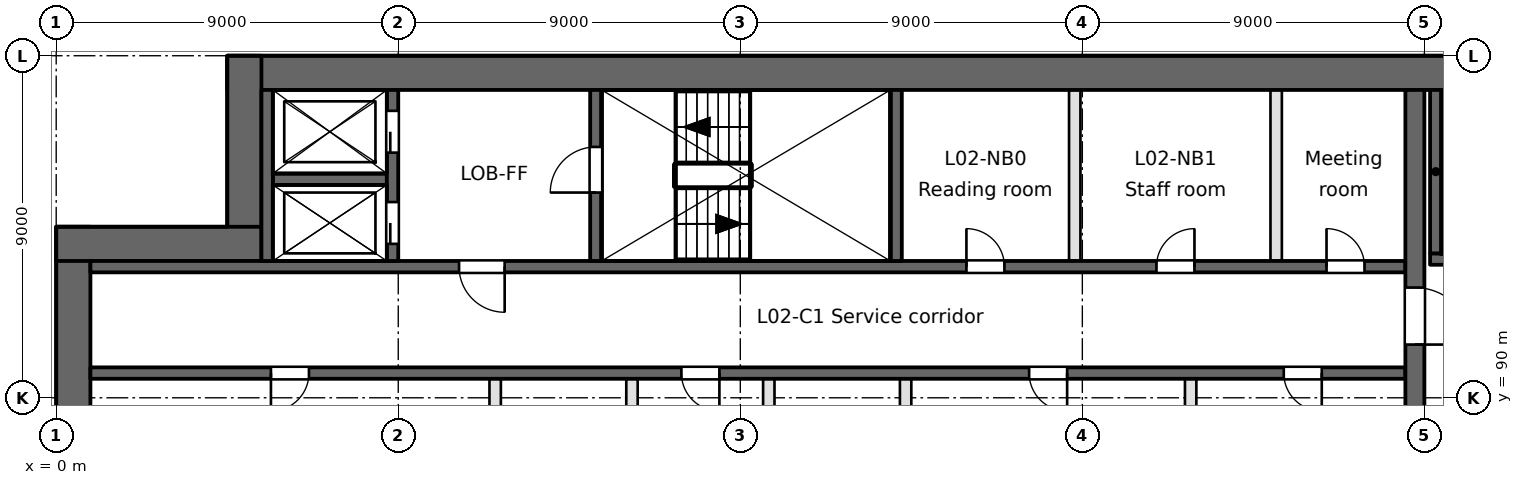
"""IFC4 building model, lengths in metres.
Left out: names, types, materials, properties, quantities, classifications, styles, units other than length and angle.
Written with IfcOpenShell. Run it as: python <this file> out.ifc"""

import sys

from ifc_helpers import new_model, si_unit, direction, frame, frame_2d, origin, place, context, subcontext, project, spatial, rectangle, extrude, element, fill, save


model = new_model("IFC4")
c1 = context("Model", 3, precision=1e-05, world=origin(), true_north=direction((0.0, 1.0)))
c2 = subcontext(c1, "Body", "Model", "MODEL_VIEW")
j1 = project(units=[si_unit("LENGTHUNIT", "METRE"), si_unit("PLANEANGLEUNIT", "RADIAN")], contexts=[c1])
p1 = place(None, origin())
s1 = spatial("IfcSite", under=j1, at=p1, CompositionType="ELEMENT")
p2 = place(p1, origin())
s2 = spatial("IfcBuilding", under=s1, at=p2, CompositionType="ELEMENT")
p3 = place(p2, frame((0.0, 0.0, 11.4)))
s3 = spatial("IfcBuildingStorey", under=s2, at=p3, CompositionType="ELEMENT", Elevation=11.4)
p4 = place(p3, frame((0.45, 94.5, 0.0), z_axis=(0.0, 0.0, 1.0), x_axis=(0.0, -1.0, 0.0)))
e1 = element("IfcWall", 1, at=p4, inside=s3, PredefinedType="SHEAR", context=c2, shape_type="SweptSolid", body=[
    extrude(rectangle(XDim=66.085, YDim=0.9, at=frame_2d((33.042, 0.0))), origin(), (0.0, 0.0, 1.0), 5.4),
])
p5 = place(p3, frame((94.5, 98.55, 0.0), z_axis=(0.0, 0.0, 1.0), x_axis=(-1.0, 0.0, 0.0)))
e2 = element("IfcWall", 2, at=p5, inside=s3, PredefinedType="SHEAR", context=c2, shape_type="SweptSolid", body=[
    extrude(rectangle(XDim=90.0, YDim=0.9, at=frame_2d((45.0, 0.0))), origin(), (0.0, 0.0, 1.0), 5.4),
])
for number, where, z_axis, x_axis in (
    (3, (4.95, 99.0, 0.0), (0.0, 0.0, 1.0), (0.0, -1.0, 0.0)),
    (4, (5.4, 94.05, 0.0), (0.0, 0.0, 1.0), (-1.0, 0.0, 0.0)),
):
    element("IfcWall", number, at=place(p3, frame(where, z_axis=z_axis, x_axis=x_axis)), inside=s3, PredefinedType="SHEAR", context=c2, shape_type="SweptSolid", body=[
        extrude(rectangle(XDim=5.4, YDim=0.9, at=frame_2d((2.7, 0.0))), origin(), (0.0, 0.0, 1.0), 5.4),
    ])
p6 = place(p3, frame((0.9, 90.65, -0.35), z_axis=(0.0, 0.0, 1.0), x_axis=(1.0, 0.0, 0.0)))
e5 = element("IfcWall", 5, at=p6, inside=s3, PredefinedType="SOLIDWALL", context=c2, shape_type="SweptSolid", body=[
    extrude(rectangle(XDim=34.6, YDim=0.3, at=frame_2d((17.3, 0.0))), origin(), (0.0, 0.0, 1.0), 5.4),
])
p7 = place(p6, frame((4.75, 0.0, 0.35)))
e6 = element("IfcOpeningElement", 6, at=p7, cuts=e5, PredefinedType="OPENING", context=c2, shape_type="SweptSolid", body=[
    extrude(rectangle(XDim=1.0, YDim=2.1, at=frame_2d((0.5, 1.05))), frame((0.0, 0.15, 0.0), z_axis=(0.0, -1.0, 0.0), x_axis=(1.0, 0.0, 0.0)), (0.0, 0.0, 1.0), 0.3),
])
p8 = place(p6, frame((24.7, 0.0, 0.35)))
e7 = element("IfcOpeningElement", 7, at=p8, cuts=e5, PredefinedType="OPENING", context=c2, shape_type="SweptSolid", body=[
    extrude(rectangle(XDim=1.0, YDim=2.1, at=frame_2d((0.5, 1.05))), frame((0.0, 0.15, 0.0), z_axis=(0.0, -1.0, 0.0), x_axis=(1.0, 0.0, 0.0)), (0.0, 0.0, 1.0), 0.3),
])
p9 = place(p6, frame((15.55, 0.0, 0.35)))
e8 = element("IfcOpeningElement", 8, at=p9, cuts=e5, PredefinedType="OPENING", context=c2, shape_type="SweptSolid", body=[
    extrude(rectangle(XDim=1.0, YDim=2.1, at=frame_2d((0.5, 1.05))), frame((0.0, 0.15, 0.0), z_axis=(0.0, -1.0, 0.0), x_axis=(1.0, 0.0, 0.0)), (0.0, 0.0, 1.0), 0.3),
])
p10 = place(p6, frame((31.4, 0.0, 0.35)))
e9 = element("IfcOpeningElement", 9, at=p10, cuts=e5, PredefinedType="OPENING", context=c2, shape_type="SweptSolid", body=[
    extrude(rectangle(XDim=1.0, YDim=2.1, at=frame_2d((0.5, 1.05))), frame((0.0, 0.15, 0.0), z_axis=(0.0, -1.0, 0.0), x_axis=(1.0, 0.0, 0.0)), (0.0, 0.0, 1.0), 0.3),
])
p11 = place(p3, frame((0.9, 93.45, -0.35), z_axis=(0.0, 0.0, 1.0), x_axis=(1.0, 0.0, 0.0)))
e10 = element("IfcWall", 10, at=p11, inside=s3, PredefinedType="SOLIDWALL", context=c2, shape_type="SweptSolid", body=[
    extrude(rectangle(XDim=34.6, YDim=0.3, at=frame_2d((17.3, 0.0))), origin(), (0.0, 0.0, 1.0), 5.4),
])
p12 = place(p11, frame((9.7, 0.0, 0.35)))
e11 = element("IfcOpeningElement", 11, at=p12, cuts=e10, PredefinedType="OPENING", context=c2, shape_type="SweptSolid", body=[
    extrude(rectangle(XDim=1.2, YDim=2.1, at=frame_2d((0.6, 1.05))), frame((0.0, 0.15, 0.0), z_axis=(0.0, -1.0, 0.0), x_axis=(1.0, 0.0, 0.0)), (0.0, 0.0, 1.0), 0.3),
])
p13 = place(p11, frame((23.05, 0.0, 0.35)))
e12 = element("IfcOpeningElement", 12, at=p13, cuts=e10, PredefinedType="OPENING", context=c2, shape_type="SweptSolid", body=[
    extrude(rectangle(XDim=1.0, YDim=2.1, at=frame_2d((0.5, 1.05))), frame((0.0, 0.15, 0.0), z_axis=(0.0, -1.0, 0.0), x_axis=(1.0, 0.0, 0.0)), (0.0, 0.0, 1.0), 0.3),
])
p14 = place(p11, frame((28.05, 0.0, 0.35)))
e13 = element("IfcOpeningElement", 13, at=p14, cuts=e10, PredefinedType="OPENING", context=c2, shape_type="SweptSolid", body=[
    extrude(rectangle(XDim=1.0, YDim=2.1, at=frame_2d((0.5, 1.05))), frame((0.0, 0.15, 0.0), z_axis=(0.0, -1.0, 0.0), x_axis=(1.0, 0.0, 0.0)), (0.0, 0.0, 1.0), 0.3),
])
p15 = place(p11, frame((32.525, 0.0, 0.35)))
e14 = element("IfcOpeningElement", 14, at=p15, cuts=e10, PredefinedType="OPENING", context=c2, shape_type="SweptSolid", body=[
    extrude(rectangle(XDim=1.0, YDim=2.1, at=frame_2d((0.5, 1.05))), frame((0.0, 0.15, 0.0), z_axis=(0.0, -1.0, 0.0), x_axis=(1.0, 0.0, 0.0)), (0.0, 0.0, 1.0), 0.3),
])
p16 = place(p3, frame((36.15, 93.65, -0.35), z_axis=(0.0, 0.0, 1.0), x_axis=(1.0, 0.0, 0.0)))
e15 = element("IfcWall", 15, at=p16, inside=s3, PredefinedType="SOLIDWALL", context=c2, shape_type="SweptSolid", body=[
    extrude(rectangle(XDim=8.2, YDim=0.3, at=frame_2d((4.1, 0.0))), origin(), (0.0, 0.0, 1.0), 5.4),
])
p17 = place(p16, frame((0.7, 0.0, 0.35)))
e16 = element("IfcOpeningElement", 16, at=p17, cuts=e15, PredefinedType="OPENING", context=c2, shape_type="SweptSolid", body=[
    extrude(rectangle(XDim=1.2, YDim=2.1, at=frame_2d((0.6, 1.05))), frame((0.0, 0.15, 0.0), z_axis=(0.0, -1.0, 0.0), x_axis=(1.0, 0.0, 0.0)), (0.0, 0.0, 1.0), 0.3),
])
p18 = place(p3, frame((5.7, 95.75, -0.35), z_axis=(0.0, 0.0, 1.0), x_axis=(1.0, 0.0, 0.0)))
e17 = element("IfcWall", 17, at=p18, inside=s3, PredefinedType="SOLIDWALL", context=c2, shape_type="SweptSolid", body=[
    extrude(rectangle(XDim=3.0, YDim=0.3, at=frame_2d((1.5, 0.0))), origin(), (0.0, 0.0, 1.0), 5.4),
])
p19 = place(p3, frame((5.55, 93.6, -0.35), z_axis=(0.0, 0.0, 1.0), x_axis=(0.0, 1.0, 0.0)))
e18 = element("IfcWall", 18, at=p19, inside=s3, PredefinedType="SOLIDWALL", context=c2, shape_type="SweptSolid", body=[
    extrude(rectangle(XDim=4.5, YDim=0.3, at=frame_2d((2.25, 0.0))), origin(), (0.0, 0.0, 1.0), 5.4),
])
p20 = place(p3, frame((8.85, 93.6, -0.35), z_axis=(0.0, 0.0, 1.0), x_axis=(0.0, 1.0, 0.0)))
e19 = element("IfcWall", 19, at=p20, inside=s3, PredefinedType="SOLIDWALL", context=c2, shape_type="SweptSolid", body=[
    extrude(rectangle(XDim=4.5, YDim=0.3, at=frame_2d((2.25, 0.0))), origin(), (0.0, 0.0, 1.0), 5.4),
])
p21 = place(p20, frame((0.45, 0.0, 0.35)))
e20 = element("IfcOpeningElement", 20, at=p21, cuts=e19, PredefinedType="OPENING", context=c2, shape_type="SweptSolid", body=[
    extrude(rectangle(XDim=1.1, YDim=2.1, at=frame_2d((0.55, 1.05))), frame((0.0, 0.15, 0.0), z_axis=(0.0, -1.0, 0.0), x_axis=(1.0, 0.0, 0.0)), (0.0, 0.0, 1.0), 0.3),
])
p22 = place(p20, frame((2.85, 0.0, 0.35)))
e21 = element("IfcOpeningElement", 21, at=p22, cuts=e19, PredefinedType="OPENING", context=c2, shape_type="SweptSolid", body=[
    extrude(rectangle(XDim=1.1, YDim=2.1, at=frame_2d((0.55, 1.05))), frame((0.0, 0.15, 0.0), z_axis=(0.0, -1.0, 0.0), x_axis=(1.0, 0.0, 0.0)), (0.0, 0.0, 1.0), 0.3),
])
p23 = place(p3, frame((11.55, 87.95, 0.0), z_axis=(0.0, 0.0, 1.0), x_axis=(0.0, 1.0, 0.0)))
e22 = element("IfcWall", 22, at=p23, inside=s3, PredefinedType="PARTITIONING", context=c2, shape_type="SweptSolid", body=[
    extrude(rectangle(XDim=2.55, YDim=0.3, at=frame_2d((1.275, 0.0))), origin(), (0.0, 0.0, 1.0), 5.05),
])
p24 = place(p3, frame((14.2, 93.6, -0.35), z_axis=(0.0, 0.0, 1.0), x_axis=(0.0, 1.0, 0.0)))
e23 = element("IfcWall", 23, at=p24, inside=s3, PredefinedType="SOLIDWALL", context=c2, shape_type="SweptSolid", body=[
    extrude(rectangle(XDim=4.5, YDim=0.3, at=frame_2d((2.25, 0.0))), origin(), (0.0, 0.0, 1.0), 5.4),
])
p25 = place(p24, frame((1.8, 0.0, 0.35)))
e24 = element("IfcOpeningElement", 24, at=p25, cuts=e23, PredefinedType="OPENING", context=c2, shape_type="SweptSolid", body=[
    extrude(rectangle(XDim=1.2, YDim=2.1, at=frame_2d((0.6, 1.05))), frame((0.0, 0.15, 0.0), z_axis=(0.0, -1.0, 0.0), x_axis=(1.0, 0.0, 0.0)), (0.0, 0.0, 1.0), 0.3),
])
for number, where, z_axis, x_axis in (
    (25, (15.15, 77.55, 0.0), (0.0, 0.0, 1.0), (0.0, 1.0, 0.0)),
    (26, (18.75, 77.55, 0.0), (0.0, 0.0, 1.0), (0.0, 1.0, 0.0)),
):
    element("IfcWall", number, at=place(p3, frame(where, z_axis=z_axis, x_axis=x_axis)), inside=s3, PredefinedType="PARTITIONING", context=c2, shape_type="SweptSolid", body=[
        extrude(rectangle(XDim=12.95, YDim=0.3, at=frame_2d((6.475, 0.0))), origin(), (0.0, 0.0, 1.0), 5.05),
    ])
p26 = place(p3, frame((22.1, 93.6, -0.35), z_axis=(0.0, 0.0, 1.0), x_axis=(0.0, 1.0, 0.0)))
e27 = element("IfcWall", 27, at=p26, inside=s3, PredefinedType="SOLIDWALL", context=c2, shape_type="SweptSolid", body=[
    extrude(rectangle(XDim=4.5, YDim=0.3, at=frame_2d((2.25, 0.0))), origin(), (0.0, 0.0, 1.0), 5.4),
])
p27 = place(p3, frame((22.35, 87.95, 0.0), z_axis=(0.0, 0.0, 1.0), x_axis=(0.0, 1.0, 0.0)))
e28 = element("IfcWall", 28, at=p27, inside=s3, PredefinedType="PARTITIONING", context=c2, shape_type="SweptSolid", body=[
    extrude(rectangle(XDim=2.55, YDim=0.3, at=frame_2d((1.275, 0.0))), origin(), (0.0, 0.0, 1.0), 5.05),
])
p28 = place(p3, frame((26.8, 93.6, 0.0), z_axis=(0.0, 0.0, 1.0), x_axis=(0.0, 1.0, 0.0)))
e29 = element("IfcWall", 29, at=p28, inside=s3, PredefinedType="PARTITIONING", context=c2, shape_type="SweptSolid", body=[
    extrude(rectangle(XDim=4.5, YDim=0.3, at=frame_2d((2.25, 0.0))), origin(), (0.0, 0.0, 1.0), 5.05),
])
p29 = place(p3, frame((29.85, 87.95, 0.0), z_axis=(0.0, 0.0, 1.0), x_axis=(0.0, 1.0, 0.0)))
e30 = element("IfcWall", 30, at=p29, inside=s3, PredefinedType="PARTITIONING", context=c2, shape_type="SweptSolid", body=[
    extrude(rectangle(XDim=2.55, YDim=0.3, at=frame_2d((1.275, 0.0))), origin(), (0.0, 0.0, 1.0), 5.05),
])
p30 = place(p3, frame((32.1, 93.6, 0.0), z_axis=(0.0, 0.0, 1.0), x_axis=(0.0, 1.0, 0.0)))
e31 = element("IfcWall", 31, at=p30, inside=s3, PredefinedType="PARTITIONING", context=c2, shape_type="SweptSolid", body=[
    extrude(rectangle(XDim=4.5, YDim=0.3, at=frame_2d((2.25, 0.0))), origin(), (0.0, 0.0, 1.0), 5.05),
])
p31 = place(p3, frame((35.75, 63.5, -0.35), z_axis=(0.0, 0.0, 1.0), x_axis=(0.0, 1.0, 0.0)))
e32 = element("IfcWall", 32, at=p31, inside=s3, PredefinedType="SOLIDWALL", context=c2, shape_type="SweptSolid", body=[
    extrude(rectangle(XDim=34.6, YDim=0.5, at=frame_2d((17.3, 0.0))), origin(), (0.0, 0.0, 1.0), 5.4),
])
p32 = place(p31, frame((9.7, 0.0, 0.35)))
e33 = element("IfcOpeningElement", 33, at=p32, cuts=e32, PredefinedType="OPENING", context=c2, shape_type="SweptSolid", body=[
    extrude(rectangle(XDim=2.4, YDim=2.1, at=frame_2d((1.2, 1.05))), frame((0.0, 0.25, 0.0), z_axis=(0.0, -1.0, 0.0), x_axis=(1.0, 0.0, 0.0)), (0.0, 0.0, 1.0), 0.5),
])
p33 = place(p31, frame((27.9, 0.0, 0.35)))
e34 = element("IfcOpeningElement", 34, at=p33, cuts=e32, PredefinedType="OPENING", context=c2, shape_type="SweptSolid", body=[
    extrude(rectangle(XDim=1.5, YDim=2.1, at=frame_2d((0.75, 1.05))), frame((0.0, 0.25, 0.0), z_axis=(0.0, -1.0, 0.0), x_axis=(1.0, 0.0, 0.0)), (0.0, 0.0, 1.0), 0.5),
])
p34 = place(p31, frame((1.5, 0.0, 0.35)))
e35 = element("IfcOpeningElement", 35, at=p34, cuts=e32, PredefinedType="OPENING", context=c2, shape_type="SweptSolid", body=[
    extrude(rectangle(XDim=1.2, YDim=2.1, at=frame_2d((0.6, 1.05))), frame((0.0, 0.25, 0.0), z_axis=(0.0, -1.0, 0.0), x_axis=(1.0, 0.0, 0.0)), (0.0, 0.0, 1.0), 0.5),
])
p35 = place(p3, frame((36.3, 93.8, -0.35), z_axis=(0.0, 0.0, 1.0), x_axis=(0.0, 1.0, 0.0)))
e36 = element("IfcWall", 36, at=p35, inside=s3, PredefinedType="SOLIDWALL", context=c2, shape_type="SweptSolid", body=[
    extrude(rectangle(XDim=4.3, YDim=0.3, at=frame_2d((2.15, 0.0))), origin(), (0.0, 0.0, 1.0), 5.4),
])
p36 = place(p21, origin())
e37 = element("IfcDoor", 37, at=p36, inside=s3, OperationType="SLIDING_TO_RIGHT", PredefinedType="DOOR", context=c2, shape_type="SweptSolid", body=[
    extrude(rectangle(XDim=1.1, YDim=2.1, at=frame_2d((0.55, 1.05))), frame((0.0, 0.025, 0.0), z_axis=(0.0, -1.0, 0.0), x_axis=(1.0, 0.0, 0.0)), (0.0, 0.0, 1.0), 0.05),
])
fill(e20, e37)
p37 = place(p22, origin())
e38 = element("IfcDoor", 38, at=p37, inside=s3, OperationType="SLIDING_TO_LEFT", PredefinedType="DOOR", context=c2, shape_type="SweptSolid", body=[
    extrude(rectangle(XDim=1.1, YDim=2.1, at=frame_2d((0.55, 1.05))), frame((0.0, 0.025, 0.0), z_axis=(0.0, -1.0, 0.0), x_axis=(1.0, 0.0, 0.0)), (0.0, 0.0, 1.0), 0.05),
])
fill(e21, e38)
p38 = place(p12, frame((1.2, 0.0, 0.0), z_axis=(0.0, 0.0, 1.0), x_axis=(-1.0, 0.0, 0.0)))
e39 = element("IfcDoor", 39, at=p38, inside=s3, OperationType="SINGLE_SWING_LEFT", PredefinedType="DOOR", context=c2, shape_type="SweptSolid", body=[
    extrude(rectangle(XDim=1.2, YDim=2.1, at=frame_2d((0.6, 1.05))), frame((0.0, 0.025, 0.0), z_axis=(0.0, -1.0, 0.0), x_axis=(1.0, 0.0, 0.0)), (0.0, 0.0, 1.0), 0.05),
])
fill(e11, e39)
p39 = place(p33, frame((1.5, 0.0, 0.0), z_axis=(0.0, 0.0, 1.0), x_axis=(-1.0, 0.0, 0.0)))
e40 = element("IfcDoor", 40, at=p39, inside=s3, OperationType="SINGLE_SWING_RIGHT", PredefinedType="DOOR", context=c2, shape_type="SweptSolid", body=[
    extrude(rectangle(XDim=1.5, YDim=2.1, at=frame_2d((0.75, 1.05))), frame((0.0, 0.025, 0.0), z_axis=(0.0, -1.0, 0.0), x_axis=(1.0, 0.0, 0.0)), (0.0, 0.0, 1.0), 0.05),
])
fill(e34, e40)
p40 = place(p25, origin())
e41 = element("IfcDoor", 41, at=p40, inside=s3, OperationType="SINGLE_SWING_LEFT", PredefinedType="DOOR", context=c2, shape_type="SweptSolid", body=[
    extrude(rectangle(XDim=1.2, YDim=2.1, at=frame_2d((0.6, 1.05))), frame((0.0, 0.025, 0.0), z_axis=(0.0, -1.0, 0.0), x_axis=(1.0, 0.0, 0.0)), (0.0, 0.0, 1.0), 0.05),
])
fill(e24, e41)
p41 = place(p7, frame((1.0, 0.0, 0.0), z_axis=(0.0, 0.0, 1.0), x_axis=(-1.0, 0.0, 0.0)))
e42 = element("IfcDoor", 42, at=p41, inside=s3, OperationType="SINGLE_SWING_RIGHT", PredefinedType="DOOR", context=c2, shape_type="SweptSolid", body=[
    extrude(rectangle(XDim=1.0, YDim=2.1, at=frame_2d((0.5, 1.05))), frame((0.0, 0.025, 0.0), z_axis=(0.0, -1.0, 0.0), x_axis=(1.0, 0.0, 0.0)), (0.0, 0.0, 1.0), 0.05),
])
fill(e6, e42)
p42 = place(p8, frame((1.0, 0.0, 0.0), z_axis=(0.0, 0.0, 1.0), x_axis=(-1.0, 0.0, 0.0)))
e43 = element("IfcDoor", 43, at=p42, inside=s3, OperationType="SINGLE_SWING_LEFT", PredefinedType="DOOR", context=c2, shape_type="SweptSolid", body=[
    extrude(rectangle(XDim=1.0, YDim=2.1, at=frame_2d((0.5, 1.05))), frame((0.0, 0.025, 0.0), z_axis=(0.0, -1.0, 0.0), x_axis=(1.0, 0.0, 0.0)), (0.0, 0.0, 1.0), 0.05),
])
fill(e7, e43)
p43 = place(p9, frame((1.0, 0.0, 0.0), z_axis=(0.0, 0.0, 1.0), x_axis=(-1.0, 0.0, 0.0)))
e44 = element("IfcDoor", 44, at=p43, inside=s3, OperationType="SINGLE_SWING_LEFT", PredefinedType="DOOR", context=c2, shape_type="SweptSolid", body=[
    extrude(rectangle(XDim=1.0, YDim=2.1, at=frame_2d((0.5, 1.05))), frame((0.0, 0.025, 0.0), z_axis=(0.0, -1.0, 0.0), x_axis=(1.0, 0.0, 0.0)), (0.0, 0.0, 1.0), 0.05),
])
fill(e8, e44)
p44 = place(p10, frame((1.0, 0.0, 0.0), z_axis=(0.0, 0.0, 1.0), x_axis=(-1.0, 0.0, 0.0)))
e45 = element("IfcDoor", 45, at=p44, inside=s3, OperationType="SINGLE_SWING_LEFT", PredefinedType="DOOR", context=c2, shape_type="SweptSolid", body=[
    extrude(rectangle(XDim=1.0, YDim=2.1, at=frame_2d((0.5, 1.05))), frame((0.0, 0.025, 0.0), z_axis=(0.0, -1.0, 0.0), x_axis=(1.0, 0.0, 0.0)), (0.0, 0.0, 1.0), 0.05),
])
fill(e9, e45)
p45 = place(p13, origin())
e46 = element("IfcDoor", 46, at=p45, inside=s3, OperationType="SINGLE_SWING_LEFT", PredefinedType="DOOR", context=c2, shape_type="SweptSolid", body=[
    extrude(rectangle(XDim=1.0, YDim=2.1, at=frame_2d((0.5, 1.05))), frame((0.0, 0.025, 0.0), z_axis=(0.0, -1.0, 0.0), x_axis=(1.0, 0.0, 0.0)), (0.0, 0.0, 1.0), 0.05),
])
fill(e12, e46)
p46 = place(p14, origin())
e47 = element("IfcDoor", 47, at=p46, inside=s3, OperationType="SINGLE_SWING_RIGHT", PredefinedType="DOOR", context=c2, shape_type="SweptSolid", body=[
    extrude(rectangle(XDim=1.0, YDim=2.1, at=frame_2d((0.5, 1.05))), frame((0.0, 0.025, 0.0), z_axis=(0.0, -1.0, 0.0), x_axis=(1.0, 0.0, 0.0)), (0.0, 0.0, 1.0), 0.05),
])
fill(e13, e47)
p47 = place(p15, origin())
e48 = element("IfcDoor", 48, at=p47, inside=s3, OperationType="SINGLE_SWING_LEFT", PredefinedType="DOOR", context=c2, shape_type="SweptSolid", body=[
    extrude(rectangle(XDim=1.0, YDim=2.1, at=frame_2d((0.5, 1.05))), frame((0.0, 0.025, 0.0), z_axis=(0.0, -1.0, 0.0), x_axis=(1.0, 0.0, 0.0)), (0.0, 0.0, 1.0), 0.05),
])
fill(e14, e48)
save(model, sys.argv[1])
